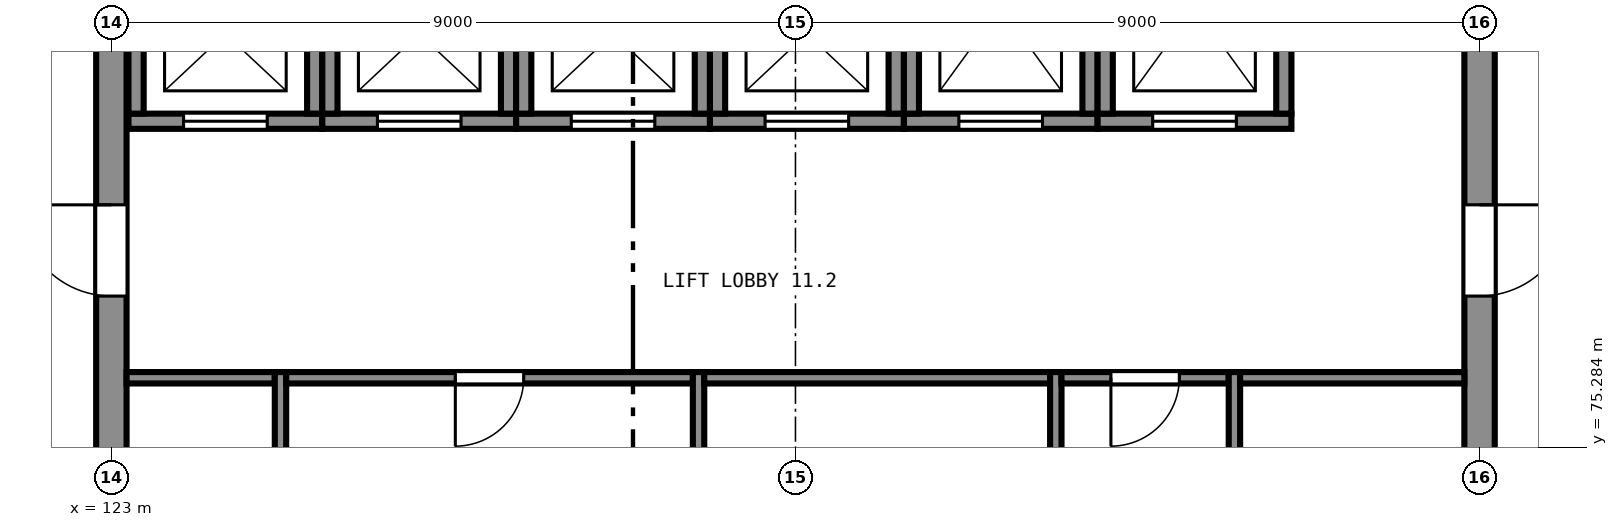
"""IFC4 building model, lengths in metres.
Left out: names, types, materials, properties, quantities, classifications, styles, units other than length and angle.
Written with IfcOpenShell. Run it as: python <this file> out.ifc"""

import sys

from ifc_helpers import new_model, si_unit, direction, frame, frame_2d, origin, place, context, subcontext, project, spatial, rectangle, extrude, element, fill, save


model = new_model("IFC4")
c1 = context("Model", 3, precision=1e-05, world=origin(), true_north=direction((0.0, 1.0)))
c2 = subcontext(c1, "Body", "Model", "MODEL_VIEW")
j1 = project(units=[si_unit("LENGTHUNIT", "METRE"), si_unit("PLANEANGLEUNIT", "RADIAN")], contexts=[c1])
p1 = place(None, origin())
s1 = spatial("IfcSite", under=j1, at=p1, CompositionType="ELEMENT")
p2 = place(p1, origin())
s2 = spatial("IfcBuilding", under=s1, at=p2, CompositionType="ELEMENT")
p3 = place(p2, frame((0.0, 0.0, 45.5)))
s3 = spatial("IfcBuildingStorey", under=s2, at=p3, CompositionType="ELEMENT", Elevation=45.5)
p4 = place(p3, frame((141.0, 65.2, 0.0), z_axis=(0.0, 0.0, 1.0), x_axis=(0.0, 1.0, 0.0)))
e1 = element("IfcWall", 1, at=p4, inside=s3, PredefinedType="SHEAR", context=c2, shape_type="SweptSolid", body=[
    extrude(rectangle(XDim=17.6, YDim=0.4, at=frame_2d((8.8, 0.0))), origin(), (0.0, 0.0, 1.0), 4.0),
])
p5 = place(p4, frame((4.325, 0.0, 0.0)))
e2 = element("IfcOpeningElement", 2, at=p5, cuts=e1, PredefinedType="OPENING", context=c2, shape_type="SweptSolid", body=[
    extrude(rectangle(XDim=1.2, YDim=2.1, at=frame_2d((0.6, 1.05))), frame((0.0, 0.21, 0.0), z_axis=(0.0, -1.0, 0.0), x_axis=(1.0, 0.0, 0.0)), (0.0, 0.0, 1.0), 0.42),
])
p6 = place(p4, frame((12.075, 0.0, 0.0)))
e3 = element("IfcOpeningElement", 3, at=p6, cuts=e1, PredefinedType="OPENING", context=c2, shape_type="SweptSolid", body=[
    extrude(rectangle(XDim=1.2, YDim=2.1, at=frame_2d((0.6, 1.05))), frame((0.0, 0.21, 0.0), z_axis=(0.0, -1.0, 0.0), x_axis=(1.0, 0.0, 0.0)), (0.0, 0.0, 1.0), 0.42),
])
p7 = place(p3, frame((123.0, 82.8, 0.0), z_axis=(0.0, 0.0, 1.0), x_axis=(0.0, -1.0, 0.0)))
e4 = element("IfcWall", 4, at=p7, inside=s3, PredefinedType="SHEAR", context=c2, shape_type="SweptSolid", body=[
    extrude(rectangle(XDim=17.6, YDim=0.4, at=frame_2d((8.8, 0.0))), origin(), (0.0, 0.0, 1.0), 4.0),
])
p8 = place(p7, frame((12.075, 0.0, 0.0)))
e5 = element("IfcOpeningElement", 5, at=p8, cuts=e4, PredefinedType="OPENING", context=c2, shape_type="SweptSolid", body=[
    extrude(rectangle(XDim=1.2, YDim=2.1, at=frame_2d((0.6, 1.05))), frame((0.0, 0.21, 0.0), z_axis=(0.0, -1.0, 0.0), x_axis=(1.0, 0.0, 0.0)), (0.0, 0.0, 1.0), 0.42),
])
p9 = place(p7, frame((4.325, 0.0, 0.0)))
e6 = element("IfcOpeningElement", 6, at=p9, cuts=e4, PredefinedType="OPENING", context=c2, shape_type="SweptSolid", body=[
    extrude(rectangle(XDim=1.2, YDim=2.1, at=frame_2d((0.6, 1.05))), frame((0.0, 0.21, 0.0), z_axis=(0.0, -1.0, 0.0), x_axis=(1.0, 0.0, 0.0)), (0.0, 0.0, 1.0), 0.42),
])
p10 = place(p3, frame((123.225, 79.575, 0.0), z_axis=(0.0, 0.0, 1.0), x_axis=(1.0, 0.0, 0.0)))
e7 = element("IfcWall", 7, at=p10, inside=s3, PredefinedType="SHEAR", context=c2, shape_type="SweptSolid", body=[
    extrude(rectangle(XDim=2.55, YDim=0.2, at=frame_2d((1.275, 0.0))), origin(), (0.0, 0.0, 1.0), 4.0),
])
p11 = place(p10, frame((0.725, 0.0, 0.0)))
e8 = element("IfcOpeningElement", 8, at=p11, cuts=e7, PredefinedType="OPENING", context=c2, shape_type="SweptSolid", body=[
    extrude(rectangle(XDim=1.1, YDim=2.1, at=frame_2d((0.55, 1.05))), frame((0.0, 0.11, 0.0), z_axis=(0.0, -1.0, 0.0), x_axis=(1.0, 0.0, 0.0)), (0.0, 0.0, 1.0), 0.22),
])
for number, where, z_axis, x_axis in (
    (9, (125.675, 79.675, 0.0), (0.0, 0.0, 1.0), (0.0, 1.0, 0.0)),
    (10, (123.325, 81.775, 0.0), (0.0, 0.0, 1.0), (0.0, -1.0, 0.0)),
):
    element("IfcWall", number, at=place(p3, frame(where, z_axis=z_axis, x_axis=x_axis)), inside=s3, PredefinedType="SHEAR", context=c2, shape_type="SweptSolid", body=[
        extrude(rectangle(XDim=2.1, YDim=0.2, at=frame_2d((1.05, 0.0))), origin(), (0.0, 0.0, 1.0), 4.0),
    ])
p12 = place(p3, frame((125.775, 79.575, 0.0), z_axis=(0.0, 0.0, 1.0), x_axis=(1.0, 0.0, 0.0)))
e11 = element("IfcWall", 11, at=p12, inside=s3, PredefinedType="SHEAR", context=c2, shape_type="SweptSolid", body=[
    extrude(rectangle(XDim=2.55, YDim=0.2, at=frame_2d((1.275, 0.0))), origin(), (0.0, 0.0, 1.0), 4.0),
])
p13 = place(p12, frame((0.725, 0.0, 0.0)))
e12 = element("IfcOpeningElement", 12, at=p13, cuts=e11, PredefinedType="OPENING", context=c2, shape_type="SweptSolid", body=[
    extrude(rectangle(XDim=1.1, YDim=2.1, at=frame_2d((0.55, 1.05))), frame((0.0, 0.11, 0.0), z_axis=(0.0, -1.0, 0.0), x_axis=(1.0, 0.0, 0.0)), (0.0, 0.0, 1.0), 0.22),
])
for number, where, z_axis, x_axis in (
    (13, (128.225, 79.675, 0.0), (0.0, 0.0, 1.0), (0.0, 1.0, 0.0)),
    (14, (125.875, 81.775, 0.0), (0.0, 0.0, 1.0), (0.0, -1.0, 0.0)),
):
    element("IfcWall", number, at=place(p3, frame(where, z_axis=z_axis, x_axis=x_axis)), inside=s3, PredefinedType="SHEAR", context=c2, shape_type="SweptSolid", body=[
        extrude(rectangle(XDim=2.1, YDim=0.2, at=frame_2d((1.05, 0.0))), origin(), (0.0, 0.0, 1.0), 4.0),
    ])
p14 = place(p3, frame((128.325, 79.575, 0.0), z_axis=(0.0, 0.0, 1.0), x_axis=(1.0, 0.0, 0.0)))
e15 = element("IfcWall", 15, at=p14, inside=s3, PredefinedType="SHEAR", context=c2, shape_type="SweptSolid", body=[
    extrude(rectangle(XDim=2.55, YDim=0.2, at=frame_2d((1.275, 0.0))), origin(), (0.0, 0.0, 1.0), 4.0),
])
p15 = place(p14, frame((0.725, 0.0, 0.0)))
e16 = element("IfcOpeningElement", 16, at=p15, cuts=e15, PredefinedType="OPENING", context=c2, shape_type="SweptSolid", body=[
    extrude(rectangle(XDim=1.1, YDim=2.1, at=frame_2d((0.55, 1.05))), frame((0.0, 0.11, 0.0), z_axis=(0.0, -1.0, 0.0), x_axis=(1.0, 0.0, 0.0)), (0.0, 0.0, 1.0), 0.22),
])
for number, where, z_axis, x_axis in (
    (17, (130.775, 79.675, 0.0), (0.0, 0.0, 1.0), (0.0, 1.0, 0.0)),
    (18, (128.425, 81.775, 0.0), (0.0, 0.0, 1.0), (0.0, -1.0, 0.0)),
):
    element("IfcWall", number, at=place(p3, frame(where, z_axis=z_axis, x_axis=x_axis)), inside=s3, PredefinedType="SHEAR", context=c2, shape_type="SweptSolid", body=[
        extrude(rectangle(XDim=2.1, YDim=0.2, at=frame_2d((1.05, 0.0))), origin(), (0.0, 0.0, 1.0), 4.0),
    ])
p16 = place(p3, frame((130.875, 79.575, 0.0), z_axis=(0.0, 0.0, 1.0), x_axis=(1.0, 0.0, 0.0)))
e19 = element("IfcWall", 19, at=p16, inside=s3, PredefinedType="SHEAR", context=c2, shape_type="SweptSolid", body=[
    extrude(rectangle(XDim=2.55, YDim=0.2, at=frame_2d((1.275, 0.0))), origin(), (0.0, 0.0, 1.0), 4.0),
])
p17 = place(p16, frame((0.725, 0.0, 0.0)))
e20 = element("IfcOpeningElement", 20, at=p17, cuts=e19, PredefinedType="OPENING", context=c2, shape_type="SweptSolid", body=[
    extrude(rectangle(XDim=1.1, YDim=2.1, at=frame_2d((0.55, 1.05))), frame((0.0, 0.11, 0.0), z_axis=(0.0, -1.0, 0.0), x_axis=(1.0, 0.0, 0.0)), (0.0, 0.0, 1.0), 0.22),
])
for number, where, z_axis, x_axis in (
    (21, (133.325, 79.675, 0.0), (0.0, 0.0, 1.0), (0.0, 1.0, 0.0)),
    (22, (130.975, 81.775, 0.0), (0.0, 0.0, 1.0), (0.0, -1.0, 0.0)),
):
    element("IfcWall", number, at=place(p3, frame(where, z_axis=z_axis, x_axis=x_axis)), inside=s3, PredefinedType="SHEAR", context=c2, shape_type="SweptSolid", body=[
        extrude(rectangle(XDim=2.1, YDim=0.2, at=frame_2d((1.05, 0.0))), origin(), (0.0, 0.0, 1.0), 4.0),
    ])
p18 = place(p3, frame((133.425, 79.575, 0.0), z_axis=(0.0, 0.0, 1.0), x_axis=(1.0, 0.0, 0.0)))
e23 = element("IfcWall", 23, at=p18, inside=s3, PredefinedType="SHEAR", context=c2, shape_type="SweptSolid", body=[
    extrude(rectangle(XDim=2.55, YDim=0.2, at=frame_2d((1.275, 0.0))), origin(), (0.0, 0.0, 1.0), 4.0),
])
p19 = place(p18, frame((0.725, 0.0, 0.0)))
e24 = element("IfcOpeningElement", 24, at=p19, cuts=e23, PredefinedType="OPENING", context=c2, shape_type="SweptSolid", body=[
    extrude(rectangle(XDim=1.1, YDim=2.1, at=frame_2d((0.55, 1.05))), frame((0.0, 0.11, 0.0), z_axis=(0.0, -1.0, 0.0), x_axis=(1.0, 0.0, 0.0)), (0.0, 0.0, 1.0), 0.22),
])
for number, where, z_axis, x_axis in (
    (25, (135.875, 79.675, 0.0), (0.0, 0.0, 1.0), (0.0, 1.0, 0.0)),
    (26, (133.525, 82.475, 0.0), (0.0, 0.0, 1.0), (0.0, -1.0, 0.0)),
):
    element("IfcWall", number, at=place(p3, frame(where, z_axis=z_axis, x_axis=x_axis)), inside=s3, PredefinedType="SHEAR", context=c2, shape_type="SweptSolid", body=[
        extrude(rectangle(XDim=2.8, YDim=0.2, at=frame_2d((1.4, 0.0))), origin(), (0.0, 0.0, 1.0), 4.0),
    ])
p20 = place(p3, frame((135.975, 79.575, 0.0), z_axis=(0.0, 0.0, 1.0), x_axis=(1.0, 0.0, 0.0)))
e27 = element("IfcWall", 27, at=p20, inside=s3, PredefinedType="SHEAR", context=c2, shape_type="SweptSolid", body=[
    extrude(rectangle(XDim=2.55, YDim=0.2, at=frame_2d((1.275, 0.0))), origin(), (0.0, 0.0, 1.0), 4.0),
])
p21 = place(p20, frame((0.725, 0.0, 0.0)))
e28 = element("IfcOpeningElement", 28, at=p21, cuts=e27, PredefinedType="OPENING", context=c2, shape_type="SweptSolid", body=[
    extrude(rectangle(XDim=1.1, YDim=2.1, at=frame_2d((0.55, 1.05))), frame((0.0, 0.11, 0.0), z_axis=(0.0, -1.0, 0.0), x_axis=(1.0, 0.0, 0.0)), (0.0, 0.0, 1.0), 0.22),
])
for number, where, z_axis, x_axis in (
    (29, (138.425, 79.675, 0.0), (0.0, 0.0, 1.0), (0.0, 1.0, 0.0)),
    (30, (136.075, 82.475, 0.0), (0.0, 0.0, 1.0), (0.0, -1.0, 0.0)),
):
    element("IfcWall", number, at=place(p3, frame(where, z_axis=z_axis, x_axis=x_axis)), inside=s3, PredefinedType="SHEAR", context=c2, shape_type="SweptSolid", body=[
        extrude(rectangle(XDim=2.8, YDim=0.2, at=frame_2d((1.4, 0.0))), origin(), (0.0, 0.0, 1.0), 4.0),
    ])
p22 = place(p3, frame((125.225, 71.725, 0.0), z_axis=(0.0, 0.0, 1.0), x_axis=(0.0, 1.0, 0.0)))
e31 = element("IfcWall", 31, at=p22, inside=s3, PredefinedType="PARTITIONING", context=c2, shape_type="SweptSolid", body=[
    extrude(rectangle(XDim=4.55, YDim=0.15, at=frame_2d((2.275, 0.0))), origin(), (0.0, 0.0, 1.0), 3.75),
])
p23 = place(p3, frame((123.2, 76.2, 0.0), z_axis=(0.0, 0.0, 1.0), x_axis=(1.0, 0.0, 0.0)))
e32 = element("IfcWall", 32, at=p23, inside=s3, PredefinedType="PARTITIONING", context=c2, shape_type="SweptSolid", body=[
    extrude(rectangle(XDim=1.95, YDim=0.15, at=frame_2d((0.975, 0.0))), origin(), (0.0, 0.0, 1.0), 3.75),
])
p24 = place(p3, frame((130.725, 71.725, 0.0), z_axis=(0.0, 0.0, 1.0), x_axis=(0.0, 1.0, 0.0)))
e33 = element("IfcWall", 33, at=p24, inside=s3, PredefinedType="PARTITIONING", context=c2, shape_type="SweptSolid", body=[
    extrude(rectangle(XDim=4.55, YDim=0.15, at=frame_2d((2.275, 0.0))), origin(), (0.0, 0.0, 1.0), 3.75),
])
p25 = place(p3, frame((125.3, 76.2, 0.0), z_axis=(0.0, 0.0, 1.0), x_axis=(1.0, 0.0, 0.0)))
e34 = element("IfcWall", 34, at=p25, inside=s3, PredefinedType="PARTITIONING", context=c2, shape_type="SweptSolid", body=[
    extrude(rectangle(XDim=5.35, YDim=0.15, at=frame_2d((2.675, 0.0))), origin(), (0.0, 0.0, 1.0), 3.75),
])
p26 = place(p25, frame((2.225, 0.0, 0.0)))
e35 = element("IfcOpeningElement", 35, at=p26, cuts=e34, PredefinedType="OPENING", context=c2, shape_type="SweptSolid", body=[
    extrude(rectangle(XDim=0.9, YDim=2.1, at=frame_2d((0.45, 1.05))), frame((0.0, 0.085, 0.0), z_axis=(0.0, -1.0, 0.0), x_axis=(1.0, 0.0, 0.0)), (0.0, 0.0, 1.0), 0.17),
])
p27 = place(p3, frame((135.425, 71.725, 0.0), z_axis=(0.0, 0.0, 1.0), x_axis=(0.0, 1.0, 0.0)))
e36 = element("IfcWall", 36, at=p27, inside=s3, PredefinedType="PARTITIONING", context=c2, shape_type="SweptSolid", body=[
    extrude(rectangle(XDim=4.55, YDim=0.15, at=frame_2d((2.275, 0.0))), origin(), (0.0, 0.0, 1.0), 3.75),
])
p28 = place(p3, frame((130.8, 76.2, 0.0), z_axis=(0.0, 0.0, 1.0), x_axis=(1.0, 0.0, 0.0)))
e37 = element("IfcWall", 37, at=p28, inside=s3, PredefinedType="PARTITIONING", context=c2, shape_type="SweptSolid", body=[
    extrude(rectangle(XDim=4.55, YDim=0.15, at=frame_2d((2.275, 0.0))), origin(), (0.0, 0.0, 1.0), 3.75),
])
p29 = place(p3, frame((137.775, 71.725, 0.0), z_axis=(0.0, 0.0, 1.0), x_axis=(0.0, 1.0, 0.0)))
e38 = element("IfcWall", 38, at=p29, inside=s3, PredefinedType="PARTITIONING", context=c2, shape_type="SweptSolid", body=[
    extrude(rectangle(XDim=4.55, YDim=0.15, at=frame_2d((2.275, 0.0))), origin(), (0.0, 0.0, 1.0), 3.75),
])
p30 = place(p3, frame((135.5, 76.2, 0.0), z_axis=(0.0, 0.0, 1.0), x_axis=(1.0, 0.0, 0.0)))
e39 = element("IfcWall", 39, at=p30, inside=s3, PredefinedType="PARTITIONING", context=c2, shape_type="SweptSolid", body=[
    extrude(rectangle(XDim=2.2, YDim=0.15, at=frame_2d((1.1, 0.0))), origin(), (0.0, 0.0, 1.0), 3.75),
])
p31 = place(p30, frame((0.65, 0.0, 0.0)))
e40 = element("IfcOpeningElement", 40, at=p31, cuts=e39, PredefinedType="OPENING", context=c2, shape_type="SweptSolid", body=[
    extrude(rectangle(XDim=0.9, YDim=2.1, at=frame_2d((0.45, 1.05))), frame((0.0, 0.085, 0.0), z_axis=(0.0, -1.0, 0.0), x_axis=(1.0, 0.0, 0.0)), (0.0, 0.0, 1.0), 0.17),
])
p32 = place(p3, frame((137.85, 76.2, 0.0), z_axis=(0.0, 0.0, 1.0), x_axis=(1.0, 0.0, 0.0)))
e41 = element("IfcWall", 41, at=p32, inside=s3, PredefinedType="PARTITIONING", context=c2, shape_type="SweptSolid", body=[
    extrude(rectangle(XDim=2.95, YDim=0.15, at=frame_2d((1.475, 0.0))), origin(), (0.0, 0.0, 1.0), 3.75),
])
p33 = place(p11, origin())
e42 = element("IfcDoor", 42, at=p33, inside=s3, OperationType="SLIDING_TO_LEFT", PredefinedType="DOOR", context=c2, shape_type="SweptSolid", body=[
    extrude(rectangle(XDim=1.1, YDim=2.1, at=frame_2d((0.55, 1.05))), frame((0.0, 0.025, 0.0), z_axis=(0.0, -1.0, 0.0), x_axis=(1.0, 0.0, 0.0)), (0.0, 0.0, 1.0), 0.05),
])
fill(e8, e42)
p34 = place(p13, origin())
e43 = element("IfcDoor", 43, at=p34, inside=s3, OperationType="SLIDING_TO_LEFT", PredefinedType="DOOR", context=c2, shape_type="SweptSolid", body=[
    extrude(rectangle(XDim=1.1, YDim=2.1, at=frame_2d((0.55, 1.05))), frame((0.0, 0.025, 0.0), z_axis=(0.0, -1.0, 0.0), x_axis=(1.0, 0.0, 0.0)), (0.0, 0.0, 1.0), 0.05),
])
fill(e12, e43)
p35 = place(p15, origin())
e44 = element("IfcDoor", 44, at=p35, inside=s3, OperationType="SLIDING_TO_LEFT", PredefinedType="DOOR", context=c2, shape_type="SweptSolid", body=[
    extrude(rectangle(XDim=1.1, YDim=2.1, at=frame_2d((0.55, 1.05))), frame((0.0, 0.025, 0.0), z_axis=(0.0, -1.0, 0.0), x_axis=(1.0, 0.0, 0.0)), (0.0, 0.0, 1.0), 0.05),
])
fill(e16, e44)
p36 = place(p17, origin())
e45 = element("IfcDoor", 45, at=p36, inside=s3, OperationType="SLIDING_TO_LEFT", PredefinedType="DOOR", context=c2, shape_type="SweptSolid", body=[
    extrude(rectangle(XDim=1.1, YDim=2.1, at=frame_2d((0.55, 1.05))), frame((0.0, 0.025, 0.0), z_axis=(0.0, -1.0, 0.0), x_axis=(1.0, 0.0, 0.0)), (0.0, 0.0, 1.0), 0.05),
])
fill(e20, e45)
p37 = place(p19, origin())
e46 = element("IfcDoor", 46, at=p37, inside=s3, OperationType="SLIDING_TO_LEFT", PredefinedType="DOOR", context=c2, shape_type="SweptSolid", body=[
    extrude(rectangle(XDim=1.1, YDim=2.1, at=frame_2d((0.55, 1.05))), frame((0.0, 0.025, 0.0), z_axis=(0.0, -1.0, 0.0), x_axis=(1.0, 0.0, 0.0)), (0.0, 0.0, 1.0), 0.05),
])
fill(e24, e46)
p38 = place(p21, origin())
e47 = element("IfcDoor", 47, at=p38, inside=s3, OperationType="SLIDING_TO_LEFT", PredefinedType="DOOR", context=c2, shape_type="SweptSolid", body=[
    extrude(rectangle(XDim=1.1, YDim=2.1, at=frame_2d((0.55, 1.05))), frame((0.0, 0.025, 0.0), z_axis=(0.0, -1.0, 0.0), x_axis=(1.0, 0.0, 0.0)), (0.0, 0.0, 1.0), 0.05),
])
fill(e28, e47)
p39 = place(p9, frame((1.2, 0.0, 0.0), z_axis=(0.0, 0.0, 1.0), x_axis=(-1.0, 0.0, 0.0)))
e48 = element("IfcDoor", 48, at=p39, inside=s3, OperationType="SINGLE_SWING_LEFT", PredefinedType="DOOR", context=c2, shape_type="SweptSolid", body=[
    extrude(rectangle(XDim=1.2, YDim=2.1, at=frame_2d((0.6, 1.05))), frame((0.0, 0.025, 0.0), z_axis=(0.0, -1.0, 0.0), x_axis=(1.0, 0.0, 0.0)), (0.0, 0.0, 1.0), 0.05),
])
fill(e6, e48)
p40 = place(p6, frame((1.2, 0.0, 0.0), z_axis=(0.0, 0.0, 1.0), x_axis=(-1.0, 0.0, 0.0)))
e49 = element("IfcDoor", 49, at=p40, inside=s3, OperationType="SINGLE_SWING_RIGHT", PredefinedType="DOOR", context=c2, shape_type="SweptSolid", body=[
    extrude(rectangle(XDim=1.2, YDim=2.1, at=frame_2d((0.6, 1.05))), frame((0.0, 0.025, 0.0), z_axis=(0.0, -1.0, 0.0), x_axis=(1.0, 0.0, 0.0)), (0.0, 0.0, 1.0), 0.05),
])
fill(e3, e49)
p41 = place(p26, frame((0.9, 0.0, 0.0), z_axis=(0.0, 0.0, 1.0), x_axis=(-1.0, 0.0, 0.0)))
e50 = element("IfcDoor", 50, at=p41, inside=s3, OperationType="SINGLE_SWING_LEFT", PredefinedType="DOOR", context=c2, shape_type="SweptSolid", body=[
    extrude(rectangle(XDim=0.9, YDim=2.1, at=frame_2d((0.45, 1.05))), frame((0.0, 0.025, 0.0), z_axis=(0.0, -1.0, 0.0), x_axis=(1.0, 0.0, 0.0)), (0.0, 0.0, 1.0), 0.05),
])
fill(e35, e50)
p42 = place(p31, frame((0.9, 0.0, 0.0), z_axis=(0.0, 0.0, 1.0), x_axis=(-1.0, 0.0, 0.0)))
e51 = element("IfcDoor", 51, at=p42, inside=s3, OperationType="SINGLE_SWING_LEFT", PredefinedType="DOOR", context=c2, shape_type="SweptSolid", body=[
    extrude(rectangle(XDim=0.9, YDim=2.1, at=frame_2d((0.45, 1.05))), frame((0.0, 0.025, 0.0), z_axis=(0.0, -1.0, 0.0), x_axis=(1.0, 0.0, 0.0)), (0.0, 0.0, 1.0), 0.05),
])
fill(e40, e51)
save(model, sys.argv[1])
